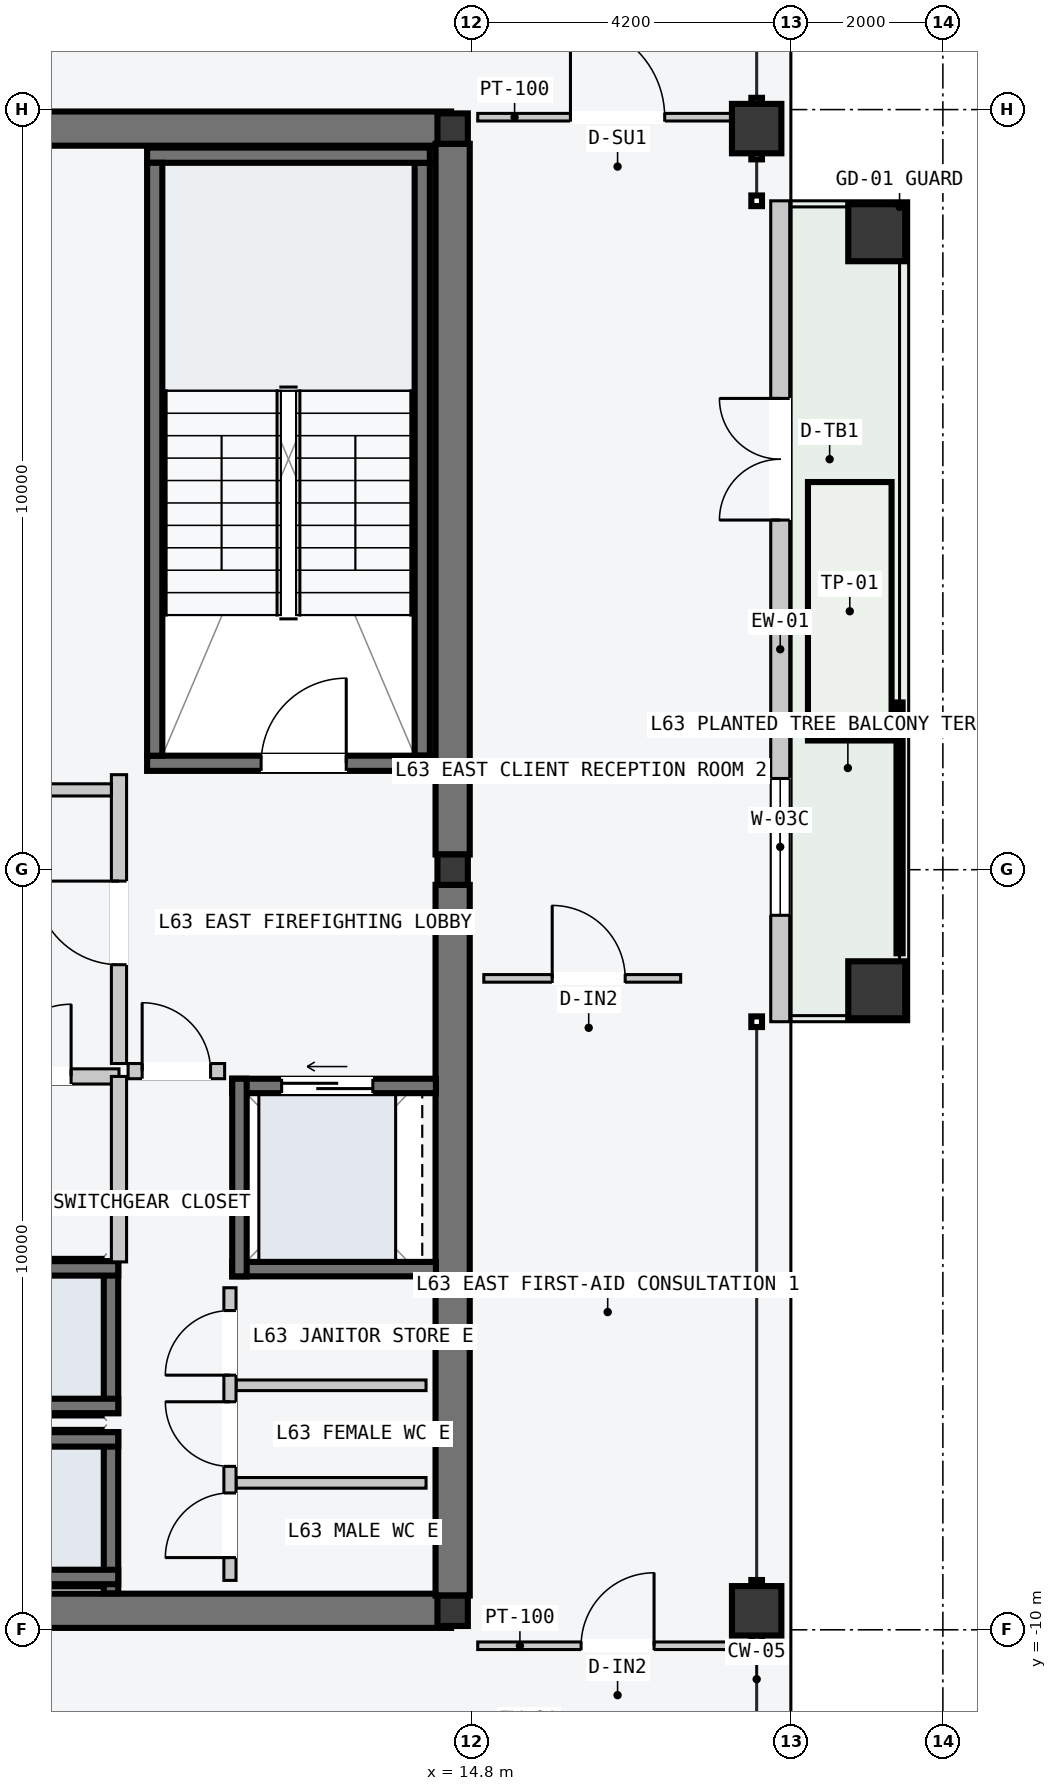
"""IFC4 building model, lengths in metres.
Left out: names, types, materials, properties, quantities, classifications, styles, units other than length and angle.
Written with IfcOpenShell. Run it as: python <this file> out.ifc"""

import sys

from ifc_helpers import new_model, si_unit, direction, frame, frame_2d, origin, origin_2d, place, context, subcontext, project, spatial, rectangle, hollow_rectangle, i_section, extrude, element, fill, save


model = new_model("IFC4")
c1 = context("Model", 3, precision=1e-05, world=origin(), true_north=direction((0.0, 1.0)))
c2 = subcontext(c1, "Body", "Model", "MODEL_VIEW")
j1 = project(units=[si_unit("LENGTHUNIT", "METRE"), si_unit("PLANEANGLEUNIT", "RADIAN")], contexts=[c1])
p1 = place(None, origin())
s1 = spatial("IfcSite", under=j1, at=p1, CompositionType="ELEMENT")
p2 = place(p1, origin())
s2 = spatial("IfcBuilding", under=s1, at=p2, CompositionType="ELEMENT")
p3 = place(p2, frame((0.0, 0.0, 240.0)))
s3 = spatial("IfcBuildingStorey", under=s2, at=p3, CompositionType="ELEMENT", Elevation=240.0)
for number, where, z_axis, x_axis in (
    (1, (8.07, -9.75, -0.2), (0.0, 0.0, 1.0), (1.0, 0.0, 0.0)),
    (2, (8.07, 9.75, -0.2), (0.0, 0.0, 1.0), (1.0, 0.0, 0.0)),
):
    element("IfcWall", number, at=place(p3, frame(where, z_axis=z_axis, x_axis=x_axis)), inside=s3, PredefinedType="SHEAR", context=c2, shape_type="SweptSolid", body=[
        extrude(rectangle(XDim=6.46, YDim=0.45, at=frame_2d((3.23, 0.0))), origin(), (0.0, 0.0, 1.0), 3.6),
    ])
for number, where, z_axis, x_axis in (
    (3, (14.55, -9.55, -0.2), (0.0, 0.0, 1.0), (0.0, 1.0, 0.0)),
    (4, (14.55, 0.2, -0.2), (0.0, 0.0, 1.0), (0.0, 1.0, 0.0)),
):
    element("IfcWall", number, at=place(p3, frame(where, z_axis=z_axis, x_axis=x_axis)), inside=s3, PredefinedType="SHEAR", context=c2, shape_type="SweptSolid", body=[
        extrude(rectangle(XDim=9.35, YDim=0.45, at=frame_2d((4.675, 0.0))), origin(), (0.0, 0.0, 1.0), 3.6),
    ])
p4 = place(p3, frame((14.15, 1.5, -0.2), z_axis=(0.0, 0.0, 1.0), x_axis=(0.0, 1.0, 0.0)))
e5 = element("IfcWall", 5, at=p4, inside=s3, PredefinedType="SOLIDWALL", context=c2, shape_type="SweptSolid", body=[
    extrude(rectangle(XDim=7.8, YDim=0.2, at=frame_2d((3.9, 0.0))), origin(), (0.0, 0.0, 1.0), 3.6),
])
p5 = place(p3, frame((10.53, 1.4, -0.2), z_axis=(0.0, 0.0, 1.0), x_axis=(1.0, 0.0, 0.0)))
e6 = element("IfcWall", 6, at=p5, inside=s3, PredefinedType="SOLIDWALL", context=c2, shape_type="SweptSolid", body=[
    extrude(rectangle(XDim=3.72, YDim=0.2, at=frame_2d((1.86, 0.0))), origin(), (0.0, 0.0, 1.0), 3.6),
])
p6 = place(p5, frame((1.5, 0.0, 0.2)))
e7 = element("IfcOpeningElement", 7, at=p6, cuts=e6, PredefinedType="OPENING", context=c2, shape_type="SweptSolid", body=[
    extrude(rectangle(XDim=1.12, YDim=2.18, at=frame_2d((0.56, 1.09))), frame((0.0, 0.11, 0.0), z_axis=(0.0, -1.0, 0.0), x_axis=(1.0, 0.0, 0.0)), (0.0, 0.0, 1.0), 0.22),
])
p7 = place(p3, frame((10.53, 9.4, -0.2), z_axis=(0.0, 0.0, 1.0), x_axis=(1.0, 0.0, 0.0)))
e8 = element("IfcWall", 8, at=p7, inside=s3, PredefinedType="SOLIDWALL", context=c2, shape_type="SweptSolid", body=[
    extrude(rectangle(XDim=3.72, YDim=0.2, at=frame_2d((1.86, 0.0))), origin(), (0.0, 0.0, 1.0), 3.6),
])
p8 = place(p3, frame((10.63, 1.5, -0.2), z_axis=(0.0, 0.0, 1.0), x_axis=(0.0, 1.0, 0.0)))
e9 = element("IfcWall", 9, at=p8, inside=s3, PredefinedType="SOLIDWALL", context=c2, shape_type="SweptSolid", body=[
    extrude(rectangle(XDim=7.8, YDim=0.2, at=frame_2d((3.9, 0.0))), origin(), (0.0, 0.0, 1.0), 3.6),
])
for number, where, z_axis, x_axis in (
    (10, (14.55, -9.75, 0.0), (0.0, 0.0, 1.0), (1.0, 0.0, 0.0)),
    (11, (14.55, 0.0, 0.0), (0.0, 0.0, 1.0), (1.0, 0.0, 0.0)),
    (12, (14.55, 9.75, 0.0), (0.0, 0.0, 1.0), (1.0, 0.0, 0.0)),
):
    element("IfcColumn", number, at=place(p3, frame(where, z_axis=z_axis, x_axis=x_axis)), inside=s3, PredefinedType="COLUMN", context=c2, shape_type="SweptSolid", body=[
        extrude(i_section(OverallWidth=0.4, OverallDepth=0.4, WebThickness=0.013, FlangeThickness=0.021, at=origin_2d()), origin(), (0.0, 0.0, 1.0), 3.6),
    ])
for number, where, z_axis, x_axis in (
    (13, (18.55, -9.75, 0.0), (0.0, 0.0, 1.0), (0.0, 1.0, 0.0)),
    (14, (18.55, 9.75, 0.0), (0.0, 0.0, 1.0), (0.0, 1.0, 0.0)),
):
    element("IfcColumn", number, at=place(p3, frame(where, z_axis=z_axis, x_axis=x_axis)), inside=s3, PredefinedType="COLUMN", context=c2, shape_type="SweptSolid", body=[
        extrude(hollow_rectangle(XDim=0.65, YDim=0.65, WallThickness=0.028, at=origin_2d()), origin(), (0.0, 0.0, 1.0), 3.6),
    ])
for number, where, z_axis, x_axis in (
    (15, (20.13, -1.58, 0.0), (0.0, 0.0, 1.0), (0.0, 1.0, 0.0)),
    (16, (20.13, 8.38, 0.0), (0.0, 0.0, 1.0), (0.0, 1.0, 0.0)),
):
    element("IfcColumn", number, at=place(p3, frame(where, z_axis=z_axis, x_axis=x_axis)), inside=s3, PredefinedType="COLUMN", context=c2, shape_type="SweptSolid", body=[
        extrude(hollow_rectangle(XDim=0.75, YDim=0.75, WallThickness=0.032, at=origin_2d()), origin(), (0.0, 0.0, 1.0), 3.6),
    ])
p9 = place(p3, frame((18.86, -2.0, 0.0), z_axis=(0.0, 0.0, 1.0), x_axis=(0.0, 1.0, 0.0)))
e17 = element("IfcWall", 17, at=p9, inside=s3, PredefinedType="STANDARD", context=c2, shape_type="SweptSolid", body=[
    extrude(rectangle(XDim=10.8, YDim=0.25, at=frame_2d((5.4, 0.0))), origin(), (0.0, 0.0, 1.0), 3.4),
])
p10 = place(p9, frame((6.6, 0.0, 0.0)))
e18 = element("IfcOpeningElement", 18, at=p10, cuts=e17, PredefinedType="OPENING", context=c2, shape_type="SweptSolid", body=[
    extrude(rectangle(XDim=1.6, YDim=2.2, at=frame_2d((0.8, 1.1))), frame((0.0, 0.135, 0.0), z_axis=(0.0, -1.0, 0.0), x_axis=(1.0, 0.0, 0.0)), (0.0, 0.0, 1.0), 0.27),
])
p11 = place(p9, frame((1.4, 0.0, 0.85)))
e19 = element("IfcOpeningElement", 19, at=p11, cuts=e17, PredefinedType="OPENING", context=c2, shape_type="SweptSolid", body=[
    extrude(rectangle(XDim=1.8, YDim=2.05, at=frame_2d((0.9, 1.025))), frame((0.0, 0.135, 0.0), z_axis=(0.0, -1.0, 0.0), x_axis=(1.0, 0.0, 0.0)), (0.0, 0.0, 1.0), 0.27),
])
p12 = place(p3, frame((10.055, -9.52, -0.2), z_axis=(0.0, 0.0, 1.0), x_axis=(0.0, 1.0, 0.0)))
e20 = element("IfcWall", 20, at=p12, inside=s3, PredefinedType="SOLIDWALL", context=c2, shape_type="SweptSolid", body=[
    extrude(rectangle(XDim=2.12, YDim=0.19, at=frame_2d((1.06, 0.0))), origin(), (0.0, 0.0, 1.0), 3.6),
])
for number, where, z_axis, x_axis in (
    (21, (7.95, -7.495, -0.2), (0.0, 0.0, 1.0), (1.0, 0.0, 0.0)),
    (22, (7.95, -9.305, -0.2), (0.0, 0.0, 1.0), (1.0, 0.0, 0.0)),
):
    element("IfcWall", number, at=place(p3, frame(where, z_axis=z_axis, x_axis=x_axis)), inside=s3, PredefinedType="SOLIDWALL", context=c2, shape_type="SweptSolid", body=[
        extrude(rectangle(XDim=2.2, YDim=0.19, at=frame_2d((1.1, 0.0))), origin(), (0.0, 0.0, 1.0), 3.6),
    ])
p13 = place(p3, frame((10.055, -7.15, -0.2), z_axis=(0.0, 0.0, 1.0), x_axis=(0.0, 1.0, 0.0)))
e23 = element("IfcWall", 23, at=p13, inside=s3, PredefinedType="SOLIDWALL", context=c2, shape_type="SweptSolid", body=[
    extrude(rectangle(XDim=2.0, YDim=0.19, at=frame_2d((1.0, 0.0))), origin(), (0.0, 0.0, 1.0), 3.6),
])
for number, where, z_axis, x_axis in (
    (24, (7.95, -5.245, -0.2), (0.0, 0.0, 1.0), (1.0, 0.0, 0.0)),
    (25, (7.95, -7.055, -0.2), (0.0, 0.0, 1.0), (1.0, 0.0, 0.0)),
):
    element("IfcWall", number, at=place(p3, frame(where, z_axis=z_axis, x_axis=x_axis)), inside=s3, PredefinedType="SOLIDWALL", context=c2, shape_type="SweptSolid", body=[
        extrude(rectangle(XDim=2.2, YDim=0.19, at=frame_2d((1.1, 0.0))), origin(), (0.0, 0.0, 1.0), 3.6),
    ])
p14 = place(p3, frame((11.65, -2.845, -0.2), z_axis=(0.0, 0.0, 1.0), x_axis=(1.0, 0.0, 0.0)))
e26 = element("IfcWall", 26, at=p14, inside=s3, PredefinedType="SOLIDWALL", context=c2, shape_type="SweptSolid", body=[
    extrude(rectangle(XDim=2.68, YDim=0.19, at=frame_2d((1.34, 0.0))), origin(), (0.0, 0.0, 1.0), 3.6),
])
p15 = place(p14, frame((0.65, 0.0, 0.2)))
e27 = element("IfcOpeningElement", 27, at=p15, cuts=e26, PredefinedType="OPENING", context=c2, shape_type="SweptSolid", body=[
    extrude(rectangle(XDim=1.2, YDim=2.2, at=frame_2d((0.6, 1.1))), frame((0.0, 0.105, 0.0), z_axis=(0.0, -1.0, 0.0), x_axis=(1.0, 0.0, 0.0)), (0.0, 0.0, 1.0), 0.21),
])
p16 = place(p3, frame((11.65, -5.255, -0.2), z_axis=(0.0, 0.0, 1.0), x_axis=(1.0, 0.0, 0.0)))
e28 = element("IfcWall", 28, at=p16, inside=s3, PredefinedType="SOLIDWALL", context=c2, shape_type="SweptSolid", body=[
    extrude(rectangle(XDim=2.68, YDim=0.19, at=frame_2d((1.34, 0.0))), origin(), (0.0, 0.0, 1.0), 3.6),
])
p17 = place(p3, frame((11.745, -5.35, -0.2), z_axis=(0.0, 0.0, 1.0), x_axis=(0.0, 1.0, 0.0)))
e29 = element("IfcWall", 29, at=p17, inside=s3, PredefinedType="SOLIDWALL", context=c2, shape_type="SweptSolid", body=[
    extrude(rectangle(XDim=2.6, YDim=0.19, at=frame_2d((1.3, 0.0))), origin(), (0.0, 0.0, 1.0), 3.6),
])
p18 = place(p3, frame((10.16, -2.55, 0.0), z_axis=(0.0, 0.0, 1.0), x_axis=(0.0, 1.0, 0.0)))
e30 = element("IfcWall", 30, at=p18, inside=s3, PredefinedType="PARTITIONING", context=c2, shape_type="SweptSolid", body=[
    extrude(rectangle(XDim=3.8, YDim=0.2, at=frame_2d((1.9, 0.0))), origin(), (0.0, 0.0, 1.0), 3.4),
])
p19 = place(p18, frame((1.3, 0.0, 0.0)))
e31 = element("IfcOpeningElement", 31, at=p19, cuts=e30, PredefinedType="OPENING", context=c2, shape_type="SweptSolid", body=[
    extrude(rectangle(XDim=1.1, YDim=2.15, at=frame_2d((0.55, 1.075))), frame((0.0, 0.11, 0.0), z_axis=(0.0, -1.0, 0.0), x_axis=(1.0, 0.0, 0.0)), (0.0, 0.0, 1.0), 0.22),
])
p20 = place(p3, frame((10.28, -2.65, 0.0), z_axis=(0.0, 0.0, 1.0), x_axis=(1.0, 0.0, 0.0)))
e32 = element("IfcWall", 32, at=p20, inside=s3, PredefinedType="PARTITIONING", context=c2, shape_type="SweptSolid", body=[
    extrude(rectangle(XDim=1.27, YDim=0.2, at=frame_2d((0.635, 0.0))), origin(), (0.0, 0.0, 1.0), 3.4),
])
p21 = place(p20, frame((0.185, 0.0, 0.0)))
e33 = element("IfcOpeningElement", 33, at=p21, cuts=e32, PredefinedType="OPENING", context=c2, shape_type="SweptSolid", body=[
    extrude(rectangle(XDim=0.9, YDim=2.15, at=frame_2d((0.45, 1.075))), frame((0.0, 0.11, 0.0), z_axis=(0.0, -1.0, 0.0), x_axis=(1.0, 0.0, 0.0)), (0.0, 0.0, 1.0), 0.22),
])
p22 = place(p3, frame((7.96, -2.72, 0.0), z_axis=(0.0, 0.0, 1.0), x_axis=(1.0, 0.0, 0.0)))
e34 = element("IfcWall", 34, at=p22, inside=s3, PredefinedType="PARTITIONING", context=c2, shape_type="SweptSolid", body=[
    extrude(rectangle(XDim=2.2, YDim=0.2, at=frame_2d((1.1, 0.0))), origin(), (0.0, 0.0, 1.0), 3.4),
])
p23 = place(p22, frame((0.62, 0.0, 0.0)))
e35 = element("IfcOpeningElement", 35, at=p23, cuts=e34, PredefinedType="OPENING", context=c2, shape_type="SweptSolid", body=[
    extrude(rectangle(XDim=0.95, YDim=2.1, at=frame_2d((0.475, 1.05))), frame((0.0, 0.11, 0.0), z_axis=(0.0, -1.0, 0.0), x_axis=(1.0, 0.0, 0.0)), (0.0, 0.0, 1.0), 0.22),
])
p24 = place(p3, frame((10.16, -5.16, 0.0), z_axis=(0.0, 0.0, 1.0), x_axis=(0.0, 1.0, 0.0)))
e36 = element("IfcWall", 36, at=p24, inside=s3, PredefinedType="PARTITIONING", context=c2, shape_type="SweptSolid", body=[
    extrude(rectangle(XDim=2.44, YDim=0.2, at=frame_2d((1.22, 0.0))), origin(), (0.0, 0.0, 1.0), 3.4),
])
for number, where, z_axis, x_axis in (
    (37, (11.7, -8.067, 0.0), (0.0, 0.0, 1.0), (1.0, 0.0, 0.0)),
    (38, (11.7, -6.783, 0.0), (0.0, 0.0, 1.0), (1.0, 0.0, 0.0)),
):
    element("IfcWall", number, at=place(p3, frame(where, z_axis=z_axis, x_axis=x_axis)), inside=s3, PredefinedType="PARTITIONING", context=c2, shape_type="SweptSolid", body=[
        extrude(rectangle(XDim=2.5, YDim=0.14, at=frame_2d((1.25, 0.0))), origin(), (0.0, 0.0, 1.0), 3.4),
    ])
p25 = place(p3, frame((11.62, -9.35, 0.0), z_axis=(0.0, 0.0, 1.0), x_axis=(0.0, 1.0, 0.0)))
e39 = element("IfcWall", 39, at=p25, inside=s3, PredefinedType="PARTITIONING", context=c2, shape_type="SweptSolid", body=[
    extrude(rectangle(XDim=3.85, YDim=0.16, at=frame_2d((1.925, 0.0))), origin(), (0.0, 0.0, 1.0), 3.4),
])
p26 = place(p25, frame((0.3, 0.0, 0.0)))
e40 = element("IfcOpeningElement", 40, at=p26, cuts=e39, PredefinedType="OPENING", context=c2, shape_type="SweptSolid", body=[
    extrude(rectangle(XDim=0.85, YDim=2.12, at=frame_2d((0.425, 1.06))), frame((0.0, 0.09, 0.0), z_axis=(0.0, -1.0, 0.0), x_axis=(1.0, 0.0, 0.0)), (0.0, 0.0, 1.0), 0.18),
])
p27 = place(p25, frame((1.5, 0.0, 0.0)))
e41 = element("IfcOpeningElement", 41, at=p27, cuts=e39, PredefinedType="OPENING", context=c2, shape_type="SweptSolid", body=[
    extrude(rectangle(XDim=0.85, YDim=2.12, at=frame_2d((0.425, 1.06))), frame((0.0, 0.09, 0.0), z_axis=(0.0, -1.0, 0.0), x_axis=(1.0, 0.0, 0.0)), (0.0, 0.0, 1.0), 0.18),
])
p28 = place(p25, frame((2.7, 0.0, 0.0)))
e42 = element("IfcOpeningElement", 42, at=p28, cuts=e39, PredefinedType="OPENING", context=c2, shape_type="SweptSolid", body=[
    extrude(rectangle(XDim=0.85, YDim=2.12, at=frame_2d((0.425, 1.06))), frame((0.0, 0.09, 0.0), z_axis=(0.0, -1.0, 0.0), x_axis=(1.0, 0.0, 0.0)), (0.0, 0.0, 1.0), 0.18),
])
p29 = place(p3, frame((3.01, 1.05, 0.0), z_axis=(0.0, 0.0, 1.0), x_axis=(1.0, 0.0, 0.0)))
e43 = element("IfcWall", 43, at=p29, inside=s3, PredefinedType="PARTITIONING", context=c2, shape_type="SweptSolid", body=[
    extrude(rectangle(XDim=7.05, YDim=0.16, at=frame_2d((3.525, 0.0))), origin(), (0.0, 0.0, 1.0), 3.4),
])
p30 = place(p3, frame((14.88, 9.9, 0.0), z_axis=(0.0, 0.0, 1.0), x_axis=(1.0, 0.0, 0.0)))
e44 = element("IfcWall", 44, at=p30, inside=s3, PredefinedType="PARTITIONING", context=c2, shape_type="SweptSolid", body=[
    extrude(rectangle(XDim=3.68, YDim=0.1, at=frame_2d((1.84, 0.0))), origin(), (0.0, 0.0, 1.0), 3.4),
])
p31 = place(p30, frame((1.22, 0.0, 0.0)))
e45 = element("IfcOpeningElement", 45, at=p31, cuts=e44, PredefinedType="OPENING", context=c2, shape_type="SweptSolid", body=[
    extrude(rectangle(XDim=1.24, YDim=2.24, at=frame_2d((0.62, 1.12))), frame((0.0, 0.06, 0.0), z_axis=(0.0, -1.0, 0.0), x_axis=(1.0, 0.0, 0.0)), (0.0, 0.0, 1.0), 0.12),
])
p32 = place(p3, frame((14.88, -10.21, 0.0), z_axis=(0.0, 0.0, 1.0), x_axis=(1.0, 0.0, 0.0)))
e46 = element("IfcWall", 46, at=p32, inside=s3, PredefinedType="PARTITIONING", context=c2, shape_type="SweptSolid", body=[
    extrude(rectangle(XDim=3.68, YDim=0.1, at=frame_2d((1.84, 0.0))), origin(), (0.0, 0.0, 1.0), 3.4),
])
p33 = place(p32, frame((1.36, 0.0, 0.0)))
e47 = element("IfcOpeningElement", 47, at=p33, cuts=e46, PredefinedType="OPENING", context=c2, shape_type="SweptSolid", body=[
    extrude(rectangle(XDim=0.96, YDim=2.18, at=frame_2d((0.48, 1.09))), frame((0.0, 0.06, 0.0), z_axis=(0.0, -1.0, 0.0), x_axis=(1.0, 0.0, 0.0)), (0.0, 0.0, 1.0), 0.12),
])
p34 = place(p3, frame((14.96, -1.43, 0.0), z_axis=(0.0, 0.0, 1.0), x_axis=(1.0, 0.0, 0.0)))
e48 = element("IfcWall", 48, at=p34, inside=s3, PredefinedType="PARTITIONING", context=c2, shape_type="SweptSolid", body=[
    extrude(rectangle(XDim=2.59, YDim=0.1, at=frame_2d((1.295, 0.0))), origin(), (0.0, 0.0, 1.0), 3.4),
])
p35 = place(p34, frame((0.9, 0.0, 0.0)))
e49 = element("IfcOpeningElement", 49, at=p35, cuts=e48, PredefinedType="OPENING", context=c2, shape_type="SweptSolid", body=[
    extrude(rectangle(XDim=0.96, YDim=2.18, at=frame_2d((0.48, 1.09))), frame((0.0, 0.06, 0.0), z_axis=(0.0, -1.0, 0.0), x_axis=(1.0, 0.0, 0.0)), (0.0, 0.0, 1.0), 0.12),
])
p36 = place(p6, origin())
e50 = element("IfcDoor", 50, at=p36, inside=s3, OperationType="SINGLE_SWING_RIGHT", PredefinedType="DOOR", context=c2, shape_type="SweptSolid", body=[
    extrude(rectangle(XDim=1.12, YDim=2.18, at=frame_2d((0.56, 1.09))), frame((0.0, 0.025, 0.0), z_axis=(0.0, -1.0, 0.0), x_axis=(1.0, 0.0, 0.0)), (0.0, 0.0, 1.0), 0.05),
])
fill(e7, e50)
p37 = place(p10, origin())
e51 = element("IfcDoor", 51, at=p37, inside=s3, OperationType="DOUBLE_DOOR_SINGLE_SWING", PredefinedType="DOOR", context=c2, shape_type="SweptSolid", body=[
    extrude(rectangle(XDim=1.6, YDim=2.2, at=frame_2d((0.8, 1.1))), frame((0.0, 0.025, 0.0), z_axis=(0.0, -1.0, 0.0), x_axis=(1.0, 0.0, 0.0)), (0.0, 0.0, 1.0), 0.05),
])
fill(e18, e51)
p38 = place(p11, origin())
e52 = element("IfcWindow", 52, at=p38, inside=s3, PartitioningType="SINGLE_PANEL", PredefinedType="WINDOW", context=c2, shape_type="SweptSolid", body=[
    extrude(rectangle(XDim=1.8, YDim=2.05, at=frame_2d((0.9, 1.025))), frame((0.0, 0.03, 0.0), z_axis=(0.0, -1.0, 0.0), x_axis=(1.0, 0.0, 0.0)), (0.0, 0.0, 1.0), 0.06),
])
fill(e19, e52)
p39 = place(p15, origin())
e53 = element("IfcDoor", 53, at=p39, inside=s3, OperationType="SLIDING_TO_LEFT", PredefinedType="DOOR", context=c2, shape_type="SweptSolid", body=[
    extrude(rectangle(XDim=1.2, YDim=2.2, at=frame_2d((0.6, 1.1))), frame((0.0, 0.025, 0.0), z_axis=(0.0, -1.0, 0.0), x_axis=(1.0, 0.0, 0.0)), (0.0, 0.0, 1.0), 0.05),
])
fill(e27, e53)
p40 = place(p19, origin())
e54 = element("IfcDoor", 54, at=p40, inside=s3, OperationType="SINGLE_SWING_RIGHT", PredefinedType="DOOR", context=c2, shape_type="SweptSolid", body=[
    extrude(rectangle(XDim=1.1, YDim=2.15, at=frame_2d((0.55, 1.075))), frame((0.0, 0.025, 0.0), z_axis=(0.0, -1.0, 0.0), x_axis=(1.0, 0.0, 0.0)), (0.0, 0.0, 1.0), 0.05),
])
fill(e31, e54)
p41 = place(p21, origin())
e55 = element("IfcDoor", 55, at=p41, inside=s3, OperationType="SINGLE_SWING_LEFT", PredefinedType="DOOR", context=c2, shape_type="SweptSolid", body=[
    extrude(rectangle(XDim=0.9, YDim=2.15, at=frame_2d((0.45, 1.075))), frame((0.0, 0.025, 0.0), z_axis=(0.0, -1.0, 0.0), x_axis=(1.0, 0.0, 0.0)), (0.0, 0.0, 1.0), 0.05),
])
fill(e33, e55)
p42 = place(p23, origin())
e56 = element("IfcDoor", 56, at=p42, inside=s3, OperationType="SINGLE_SWING_RIGHT", PredefinedType="DOOR", context=c2, shape_type="SweptSolid", body=[
    extrude(rectangle(XDim=0.95, YDim=2.1, at=frame_2d((0.475, 1.05))), frame((0.0, 0.025, 0.0), z_axis=(0.0, -1.0, 0.0), x_axis=(1.0, 0.0, 0.0)), (0.0, 0.0, 1.0), 0.05),
])
fill(e35, e56)
p43 = place(p26, origin())
e57 = element("IfcDoor", 57, at=p43, inside=s3, OperationType="SINGLE_SWING_LEFT", PredefinedType="DOOR", context=c2, shape_type="SweptSolid", body=[
    extrude(rectangle(XDim=0.85, YDim=2.12, at=frame_2d((0.425, 1.06))), frame((0.0, 0.025, 0.0), z_axis=(0.0, -1.0, 0.0), x_axis=(1.0, 0.0, 0.0)), (0.0, 0.0, 1.0), 0.05),
])
fill(e40, e57)
p44 = place(p27, origin())
e58 = element("IfcDoor", 58, at=p44, inside=s3, OperationType="SINGLE_SWING_RIGHT", PredefinedType="DOOR", context=c2, shape_type="SweptSolid", body=[
    extrude(rectangle(XDim=0.85, YDim=2.12, at=frame_2d((0.425, 1.06))), frame((0.0, 0.025, 0.0), z_axis=(0.0, -1.0, 0.0), x_axis=(1.0, 0.0, 0.0)), (0.0, 0.0, 1.0), 0.05),
])
fill(e41, e58)
p45 = place(p28, origin())
e59 = element("IfcDoor", 59, at=p45, inside=s3, OperationType="SINGLE_SWING_LEFT", PredefinedType="DOOR", context=c2, shape_type="SweptSolid", body=[
    extrude(rectangle(XDim=0.85, YDim=2.12, at=frame_2d((0.425, 1.06))), frame((0.0, 0.025, 0.0), z_axis=(0.0, -1.0, 0.0), x_axis=(1.0, 0.0, 0.0)), (0.0, 0.0, 1.0), 0.05),
])
fill(e42, e59)
p46 = place(p31, origin())
e60 = element("IfcDoor", 60, at=p46, inside=s3, OperationType="SINGLE_SWING_LEFT", PredefinedType="DOOR", context=c2, shape_type="SweptSolid", body=[
    extrude(rectangle(XDim=1.24, YDim=2.24, at=frame_2d((0.62, 1.12))), frame((0.0, 0.025, 0.0), z_axis=(0.0, -1.0, 0.0), x_axis=(1.0, 0.0, 0.0)), (0.0, 0.0, 1.0), 0.05),
])
fill(e45, e60)
p47 = place(p33, origin())
e61 = element("IfcDoor", 61, at=p47, inside=s3, OperationType="SINGLE_SWING_RIGHT", PredefinedType="DOOR", context=c2, shape_type="SweptSolid", body=[
    extrude(rectangle(XDim=0.96, YDim=2.18, at=frame_2d((0.48, 1.09))), frame((0.0, 0.025, 0.0), z_axis=(0.0, -1.0, 0.0), x_axis=(1.0, 0.0, 0.0)), (0.0, 0.0, 1.0), 0.05),
])
fill(e47, e61)
p48 = place(p35, origin())
e62 = element("IfcDoor", 62, at=p48, inside=s3, OperationType="SINGLE_SWING_LEFT", PredefinedType="DOOR", context=c2, shape_type="SweptSolid", body=[
    extrude(rectangle(XDim=0.96, YDim=2.18, at=frame_2d((0.48, 1.09))), frame((0.0, 0.025, 0.0), z_axis=(0.0, -1.0, 0.0), x_axis=(1.0, 0.0, 0.0)), (0.0, 0.0, 1.0), 0.05),
])
fill(e49, e62)
save(model, sys.argv[1])
